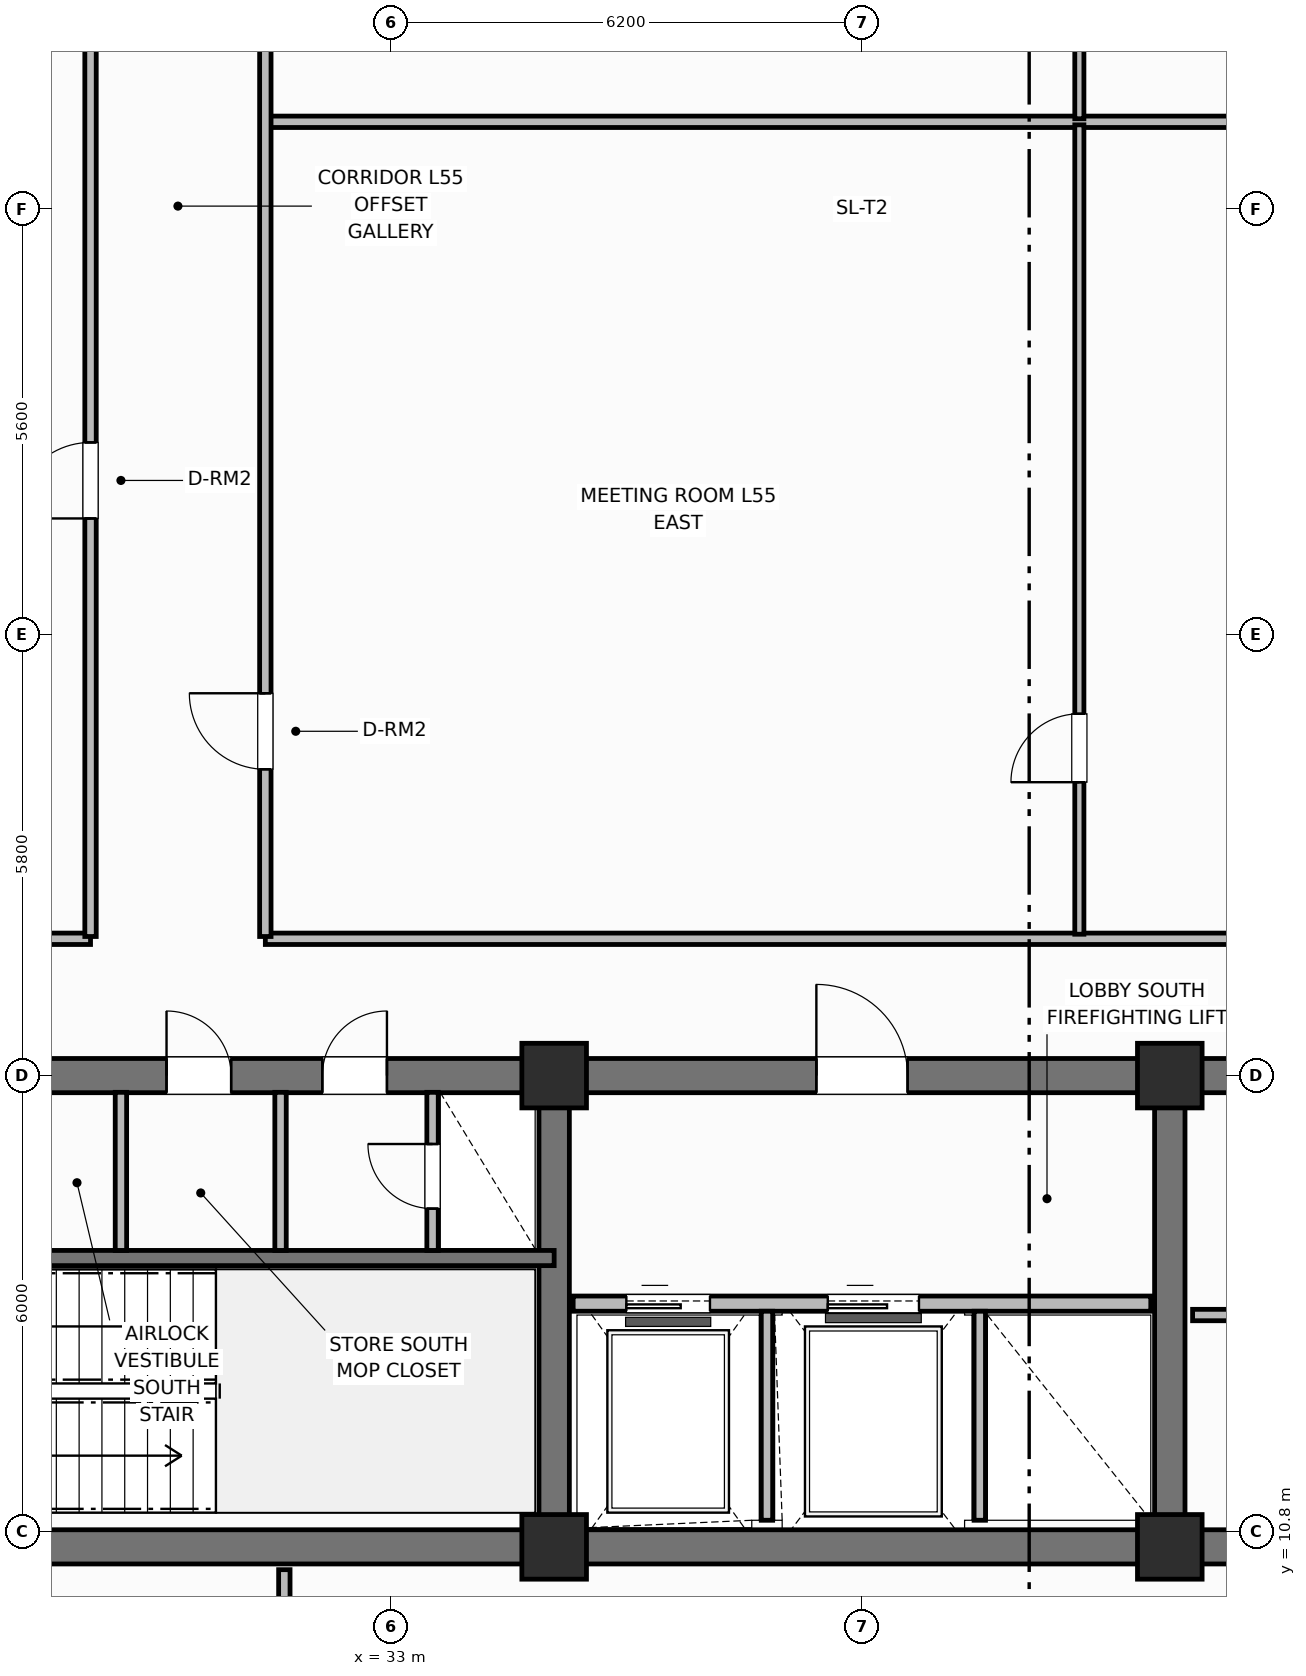
"""IFC4 building model, lengths in metres.
Left out: names, types, materials, properties, quantities, classifications, styles, units other than length and angle.
Written with IfcOpenShell. Run it as: python <this file> out.ifc"""

import sys

from ifc_helpers import new_model, si_unit, direction, frame, frame_2d, origin, origin_2d, place, context, subcontext, project, spatial, rectangle, extrude, element, fill, save


model = new_model("IFC4")
c1 = context("Model", 3, precision=1e-05, world=origin(), true_north=direction((0.0, 1.0)))
c2 = subcontext(c1, "Body", "Model", "MODEL_VIEW")
j1 = project(units=[si_unit("LENGTHUNIT", "METRE"), si_unit("PLANEANGLEUNIT", "RADIAN")], contexts=[c1])
p1 = place(None, origin())
s1 = spatial("IfcSite", under=j1, at=p1, CompositionType="ELEMENT")
p2 = place(p1, origin())
s2 = spatial("IfcBuilding", under=s1, at=p2, CompositionType="ELEMENT")
p3 = place(p2, frame((0.0, 0.0, 222.1)))
s3 = spatial("IfcBuildingStorey", under=s2, at=p3, CompositionType="ELEMENT", Elevation=222.1)
p4 = place(p3, frame((52.8, 10.6, 0.0), z_axis=(0.0, 0.0, 1.0), x_axis=(-1.0, 0.0, 0.0)))
e1 = element("IfcWall", 1, at=p4, inside=s3, PredefinedType="SHEAR", context=c2, shape_type="SweptSolid", body=[
    extrude(rectangle(XDim=27.2, YDim=0.45, at=frame_2d((13.6, 0.0))), origin(), (0.0, 0.0, 1.0), 3.7),
])
p5 = place(p3, frame((25.6, 16.8, 0.0), z_axis=(0.0, 0.0, 1.0), x_axis=(1.0, 0.0, 0.0)))
e2 = element("IfcWall", 2, at=p5, inside=s3, PredefinedType="SHEAR", context=c2, shape_type="SweptSolid", body=[
    extrude(rectangle(XDim=27.2, YDim=0.45, at=frame_2d((13.6, 0.0))), origin(), (0.0, 0.0, 1.0), 3.7),
])
p6 = place(p5, frame((1.7, 0.0, 0.0)))
e3 = element("IfcOpeningElement", 3, at=p6, cuts=e2, PredefinedType="OPENING", context=c2, shape_type="SweptSolid", body=[
    extrude(rectangle(XDim=1.1, YDim=2.15, at=frame_2d((0.55, 1.075))), frame((0.0, 0.235, 0.0), z_axis=(0.0, -1.0, 0.0), x_axis=(1.0, 0.0, 0.0)), (0.0, 0.0, 1.0), 0.47),
])
p7 = place(p5, frame((4.45, 0.0, 0.0)))
e4 = element("IfcOpeningElement", 4, at=p7, cuts=e2, PredefinedType="OPENING", context=c2, shape_type="SweptSolid", body=[
    extrude(rectangle(XDim=0.85, YDim=2.1, at=frame_2d((0.425, 1.05))), frame((0.0, 0.235, 0.0), z_axis=(0.0, -1.0, 0.0), x_axis=(1.0, 0.0, 0.0)), (0.0, 0.0, 1.0), 0.47),
])
p8 = place(p5, frame((6.5, 0.0, 0.0)))
e5 = element("IfcOpeningElement", 5, at=p8, cuts=e2, PredefinedType="OPENING", context=c2, shape_type="SweptSolid", body=[
    extrude(rectangle(XDim=0.85, YDim=2.1, at=frame_2d((0.425, 1.05))), frame((0.0, 0.235, 0.0), z_axis=(0.0, -1.0, 0.0), x_axis=(1.0, 0.0, 0.0)), (0.0, 0.0, 1.0), 0.47),
])
p9 = place(p5, frame((13.0, 0.0, 0.0)))
e6 = element("IfcOpeningElement", 6, at=p9, cuts=e2, PredefinedType="OPENING", context=c2, shape_type="SweptSolid", body=[
    extrude(rectangle(XDim=1.2, YDim=2.15, at=frame_2d((0.6, 1.075))), frame((0.0, 0.235, 0.0), z_axis=(0.0, -1.0, 0.0), x_axis=(1.0, 0.0, 0.0)), (0.0, 0.0, 1.0), 0.47),
])
p10 = place(p5, frame((19.8, 0.0, 0.0)))
e7 = element("IfcOpeningElement", 7, at=p10, cuts=e2, PredefinedType="OPENING", context=c2, shape_type="SweptSolid", body=[
    extrude(rectangle(XDim=0.85, YDim=2.1, at=frame_2d((0.425, 1.05))), frame((0.0, 0.235, 0.0), z_axis=(0.0, -1.0, 0.0), x_axis=(1.0, 0.0, 0.0)), (0.0, 0.0, 1.0), 0.47),
])
p11 = place(p5, frame((24.2, 0.0, 0.0)))
e8 = element("IfcOpeningElement", 8, at=p11, cuts=e2, PredefinedType="OPENING", context=c2, shape_type="SweptSolid", body=[
    extrude(rectangle(XDim=0.85, YDim=2.1, at=frame_2d((0.425, 1.05))), frame((0.0, 0.235, 0.0), z_axis=(0.0, -1.0, 0.0), x_axis=(1.0, 0.0, 0.0)), (0.0, 0.0, 1.0), 0.47),
])
for number, where, z_axis, x_axis in (
    (9, (35.15, 10.825, 0.0), (0.0, 0.0, 1.0), (0.0, 1.0, 0.0)),
    (10, (43.25, 10.825, 0.0), (0.0, 0.0, 1.0), (0.0, 1.0, 0.0)),
):
    element("IfcWall", number, at=place(p3, frame(where, z_axis=z_axis, x_axis=x_axis)), inside=s3, PredefinedType="SHEAR", context=c2, shape_type="SweptSolid", body=[
        extrude(rectangle(XDim=5.75, YDim=0.4, at=frame_2d((2.875, 0.0))), origin(), (0.0, 0.0, 1.0), 3.7),
    ])
for number, where, z_axis, x_axis in (
    (11, (35.15, 10.6, 0.0), (0.0, 0.0, 1.0), (1.0, 0.0, 0.0)),
    (12, (35.15, 16.8, 0.0), (0.0, 0.0, 1.0), (1.0, 0.0, 0.0)),
    (13, (43.25, 10.6, 0.0), (0.0, 0.0, 1.0), (1.0, 0.0, 0.0)),
    (14, (43.25, 16.8, 0.0), (0.0, 0.0, 1.0), (1.0, 0.0, 0.0)),
):
    element("IfcColumn", number, at=place(p3, frame(where, z_axis=z_axis, x_axis=x_axis)), inside=s3, PredefinedType="COLUMN", context=c2, shape_type="SweptSolid", body=[
        extrude(rectangle(XDim=0.85, YDim=0.85, at=origin_2d()), origin(), (0.0, 0.0, 1.0), 3.7),
    ])
p12 = place(p3, frame((25.6, 14.4, 0.0), z_axis=(0.0, 0.0, 1.0), x_axis=(1.0, 0.0, 0.0)))
e15 = element("IfcWall", 15, at=p12, inside=s3, PredefinedType="SHEAR", context=c2, shape_type="SweptSolid", body=[
    extrude(rectangle(XDim=9.55, YDim=0.2, at=frame_2d((4.775, 0.0))), origin(), (0.0, 0.0, 1.0), 3.7),
])
p13 = place(p12, frame((1.05, 0.0, 0.0)))
e16 = element("IfcOpeningElement", 16, at=p13, cuts=e15, PredefinedType="OPENING", context=c2, shape_type="SweptSolid", body=[
    extrude(rectangle(XDim=1.1, YDim=2.15, at=frame_2d((0.55, 1.075))), frame((0.0, 0.11, 0.0), z_axis=(0.0, -1.0, 0.0), x_axis=(1.0, 0.0, 0.0)), (0.0, 0.0, 1.0), 0.22),
])
for number, where, z_axis, x_axis in (
    (17, (29.45, 14.5, 0.0), (0.0, 0.0, 1.0), (0.0, 1.0, 0.0)),
    (18, (31.55, 14.5, 0.0), (0.0, 0.0, 1.0), (0.0, 1.0, 0.0)),
):
    element("IfcWall", number, at=place(p3, frame(where, z_axis=z_axis, x_axis=x_axis)), inside=s3, PredefinedType="PARTITIONING", context=c2, shape_type="SweptSolid", body=[
        extrude(rectangle(XDim=2.08, YDim=0.15, at=frame_2d((1.04, 0.0))), origin(), (0.0, 0.0, 1.0), 2.24),
    ])
p14 = place(p3, frame((33.55, 14.5, 0.0), z_axis=(0.0, 0.0, 1.0), x_axis=(0.0, 1.0, 0.0)))
e19 = element("IfcWall", 19, at=p14, inside=s3, PredefinedType="PARTITIONING", context=c2, shape_type="SweptSolid", body=[
    extrude(rectangle(XDim=2.08, YDim=0.15, at=frame_2d((1.04, 0.0))), origin(), (0.0, 0.0, 1.0), 2.24),
])
p15 = place(p14, frame((0.55, 0.0, 0.0)))
e20 = element("IfcOpeningElement", 20, at=p15, cuts=e19, PredefinedType="OPENING", context=c2, shape_type="SweptSolid", body=[
    extrude(rectangle(XDim=0.85, YDim=2.05, at=frame_2d((0.425, 1.025))), frame((0.0, 0.085, 0.0), z_axis=(0.0, -1.0, 0.0), x_axis=(1.0, 0.0, 0.0)), (0.0, 0.0, 1.0), 0.17),
])
p16 = place(p3, frame((35.4, 13.8, 0.0), z_axis=(0.0, 0.0, 1.0), x_axis=(1.0, 0.0, 0.0)))
e21 = element("IfcWall", 21, at=p16, inside=s3, PredefinedType="PARTITIONING", context=c2, shape_type="SweptSolid", body=[
    extrude(rectangle(XDim=7.6, YDim=0.2, at=frame_2d((3.8, 0.0))), origin(), (0.0, 0.0, 1.0), 2.18),
])
p17 = place(p16, frame((0.7, 0.0, 0.0)))
e22 = element("IfcOpeningElement", 22, at=p17, cuts=e21, PredefinedType="OPENING", context=c2, shape_type="SweptSolid", body=[
    extrude(rectangle(XDim=1.1, YDim=2.15, at=frame_2d((0.55, 1.075))), frame((0.0, 0.11, 0.0), z_axis=(0.0, -1.0, 0.0), x_axis=(1.0, 0.0, 0.0)), (0.0, 0.0, 1.0), 0.22),
])
p18 = place(p16, frame((3.35, 0.0, 0.0)))
e23 = element("IfcOpeningElement", 23, at=p18, cuts=e21, PredefinedType="OPENING", context=c2, shape_type="SweptSolid", body=[
    extrude(rectangle(XDim=1.2, YDim=2.15, at=frame_2d((0.6, 1.075))), frame((0.0, 0.11, 0.0), z_axis=(0.0, -1.0, 0.0), x_axis=(1.0, 0.0, 0.0)), (0.0, 0.0, 1.0), 0.22),
])
for number, where, z_axis, x_axis in (
    (24, (37.95, 10.95, 0.0), (0.0, 0.0, 1.0), (0.0, 1.0, 0.0)),
    (25, (40.75, 10.95, 0.0), (0.0, 0.0, 1.0), (0.0, 1.0, 0.0)),
):
    element("IfcWall", number, at=place(p3, frame(where, z_axis=z_axis, x_axis=x_axis)), inside=s3, PredefinedType="PARTITIONING", context=c2, shape_type="SweptSolid", body=[
        extrude(rectangle(XDim=2.75, YDim=0.15, at=frame_2d((1.375, 0.0))), origin(), (0.0, 0.0, 1.0), 2.24),
    ])
p19 = place(p3, frame((43.55, 13.65, 0.0), z_axis=(0.0, 0.0, 1.0), x_axis=(1.0, 0.0, 0.0)))
e26 = element("IfcWall", 26, at=p19, inside=s3, PredefinedType="PARTITIONING", context=c2, shape_type="SweptSolid", body=[
    extrude(rectangle(XDim=4.4, YDim=0.15, at=frame_2d((2.2, 0.0))), origin(), (0.0, 0.0, 1.0), 2.24),
])
p20 = place(p19, frame((1.6, 0.0, 0.0)))
e27 = element("IfcOpeningElement", 27, at=p20, cuts=e26, PredefinedType="OPENING", context=c2, shape_type="SweptSolid", body=[
    extrude(rectangle(XDim=0.85, YDim=2.1, at=frame_2d((0.425, 1.05))), frame((0.0, 0.085, 0.0), z_axis=(0.0, -1.0, 0.0), x_axis=(1.0, 0.0, 0.0)), (0.0, 0.0, 1.0), 0.17),
])
p21 = place(p3, frame((25.55, 18.6, 0.0), z_axis=(0.0, 0.0, 1.0), x_axis=(1.0, 0.0, 0.0)))
e28 = element("IfcWall", 28, at=p21, inside=s3, PredefinedType="PARTITIONING", context=c2, shape_type="SweptSolid", body=[
    extrude(rectangle(XDim=3.5, YDim=0.15, at=frame_2d((1.75, 0.0))), origin(), (0.0, 0.0, 1.0), 2.24),
])
p22 = place(p3, frame((31.35, 18.6, 0.0), z_axis=(0.0, 0.0, 1.0), x_axis=(1.0, 0.0, 0.0)))
e29 = element("IfcWall", 29, at=p22, inside=s3, PredefinedType="PARTITIONING", context=c2, shape_type="SweptSolid", body=[
    extrude(rectangle(XDim=21.5, YDim=0.15, at=frame_2d((10.75, 0.0))), origin(), (0.0, 0.0, 1.0), 2.24),
])
p23 = place(p3, frame((31.38, 29.348, 0.0), z_axis=(0.0, 0.0, 1.0), x_axis=(1.0, 0.0, 0.0)))
e30 = element("IfcWall", 30, at=p23, inside=s3, PredefinedType="PARTITIONING", context=c2, shape_type="SweptSolid", body=[
    extrude(rectangle(XDim=21.42, YDim=0.15, at=frame_2d((10.71, 0.0))), origin(), (0.0, 0.0, 1.0), 2.24),
])
p24 = place(p3, frame((42.06, 18.66, 0.0), z_axis=(0.0, 0.0, 1.0), x_axis=(0.0, 1.0, 0.0)))
e31 = element("IfcWall", 31, at=p24, inside=s3, PredefinedType="PARTITIONING", context=c2, shape_type="SweptSolid", body=[
    extrude(rectangle(XDim=10.648, YDim=0.12, at=frame_2d((5.324, 0.0))), origin(), (0.0, 0.0, 1.0), 2.24),
])
p25 = place(p24, frame((2.0, 0.0, 0.0)))
e32 = element("IfcOpeningElement", 32, at=p25, cuts=e31, PredefinedType="OPENING", context=c2, shape_type="SweptSolid", body=[
    extrude(rectangle(XDim=0.9, YDim=2.1, at=frame_2d((0.45, 1.05))), frame((0.0, 0.07, 0.0), z_axis=(0.0, -1.0, 0.0), x_axis=(1.0, 0.0, 0.0)), (0.0, 0.0, 1.0), 0.14),
])
p26 = place(p3, frame((42.06, 29.388, 0.0), z_axis=(0.0, 0.0, 1.0), x_axis=(0.0, 1.0, 0.0)))
e33 = element("IfcWall", 33, at=p26, inside=s3, PredefinedType="PARTITIONING", context=c2, shape_type="SweptSolid", body=[
    extrude(rectangle(XDim=8.352, YDim=0.12, at=frame_2d((4.176, 0.0))), origin(), (0.0, 0.0, 1.0), 2.24),
])
p27 = place(p26, frame((2.0, 0.0, 0.0)))
e34 = element("IfcOpeningElement", 34, at=p27, cuts=e33, PredefinedType="OPENING", context=c2, shape_type="SweptSolid", body=[
    extrude(rectangle(XDim=0.9, YDim=2.1, at=frame_2d((0.45, 1.05))), frame((0.0, 0.07, 0.0), z_axis=(0.0, -1.0, 0.0), x_axis=(1.0, 0.0, 0.0)), (0.0, 0.0, 1.0), 0.14),
])
p28 = place(p3, frame((29.05, 18.63, 0.0), z_axis=(0.0, 0.0, 1.0), x_axis=(0.0, 1.0, 0.0)))
e35 = element("IfcWall", 35, at=p28, inside=s3, PredefinedType="PARTITIONING", context=c2, shape_type="SweptSolid", body=[
    extrude(rectangle(XDim=19.14, YDim=0.15, at=frame_2d((9.57, 0.0))), origin(), (0.0, 0.0, 1.0), 2.24),
])
p29 = place(p28, frame((5.5, 0.0, 0.0)))
e36 = element("IfcOpeningElement", 36, at=p29, cuts=e35, PredefinedType="OPENING", context=c2, shape_type="SweptSolid", body=[
    extrude(rectangle(XDim=1.0, YDim=2.15, at=frame_2d((0.5, 1.075))), frame((0.0, 0.085, 0.0), z_axis=(0.0, -1.0, 0.0), x_axis=(1.0, 0.0, 0.0)), (0.0, 0.0, 1.0), 0.17),
])
p30 = place(p3, frame((31.35, 18.63, 0.0), z_axis=(0.0, 0.0, 1.0), x_axis=(0.0, 1.0, 0.0)))
e37 = element("IfcWall", 37, at=p30, inside=s3, PredefinedType="PARTITIONING", context=c2, shape_type="SweptSolid", body=[
    extrude(rectangle(XDim=19.14, YDim=0.15, at=frame_2d((9.57, 0.0))), origin(), (0.0, 0.0, 1.0), 2.24),
])
p31 = place(p30, frame((2.2, 0.0, 0.0)))
e38 = element("IfcOpeningElement", 38, at=p31, cuts=e37, PredefinedType="OPENING", context=c2, shape_type="SweptSolid", body=[
    extrude(rectangle(XDim=1.0, YDim=2.15, at=frame_2d((0.5, 1.075))), frame((0.0, 0.085, 0.0), z_axis=(0.0, -1.0, 0.0), x_axis=(1.0, 0.0, 0.0)), (0.0, 0.0, 1.0), 0.17),
])
p32 = place(p30, frame((12.719, 0.0, 0.0)))
e39 = element("IfcOpeningElement", 39, at=p32, cuts=e37, PredefinedType="OPENING", context=c2, shape_type="SweptSolid", body=[
    extrude(rectangle(XDim=1.0, YDim=2.15, at=frame_2d((0.5, 1.075))), frame((0.0, 0.085, 0.0), z_axis=(0.0, -1.0, 0.0), x_axis=(1.0, 0.0, 0.0)), (0.0, 0.0, 1.0), 0.17),
])
p33 = place(p3, frame((31.6, 6.87, 0.0), z_axis=(0.0, 0.0, 1.0), x_axis=(0.0, 1.0, 0.0)))
e40 = element("IfcWall", 40, at=p33, inside=s3, PredefinedType="PARTITIONING", context=c2, shape_type="SweptSolid", body=[
    extrude(rectangle(XDim=3.43, YDim=0.15, at=frame_2d((1.715, 0.0))), origin(), (0.0, 0.0, 1.0), 2.24),
])
p34 = place(p33, frame((1.7, 0.0, 0.0)))
e41 = element("IfcOpeningElement", 41, at=p34, cuts=e40, PredefinedType="OPENING", context=c2, shape_type="SweptSolid", body=[
    extrude(rectangle(XDim=0.9, YDim=2.1, at=frame_2d((0.45, 1.05))), frame((0.0, 0.085, 0.0), z_axis=(0.0, -1.0, 0.0), x_axis=(1.0, 0.0, 0.0)), (0.0, 0.0, 1.0), 0.17),
])
p35 = place(p15, origin())
e42 = element("IfcDoor", 42, at=p35, inside=s3, OperationType="SINGLE_SWING_RIGHT", PredefinedType="TRAPDOOR", context=c2, shape_type="SweptSolid", body=[
    extrude(rectangle(XDim=0.85, YDim=2.05, at=frame_2d((0.425, 1.025))), frame((0.0, 0.025, 0.0), z_axis=(0.0, -1.0, 0.0), x_axis=(1.0, 0.0, 0.0)), (0.0, 0.0, 1.0), 0.05),
])
fill(e20, e42)
p36 = place(p17, origin())
e43 = element("IfcDoor", 43, at=p36, inside=s3, OperationType="SLIDING_TO_LEFT", PredefinedType="DOOR", context=c2, shape_type="SweptSolid", body=[
    extrude(rectangle(XDim=1.1, YDim=2.15, at=frame_2d((0.55, 1.075))), frame((0.0, 0.025, 0.0), z_axis=(0.0, -1.0, 0.0), x_axis=(1.0, 0.0, 0.0)), (0.0, 0.0, 1.0), 0.05),
])
fill(e22, e43)
p37 = place(p18, origin())
e44 = element("IfcDoor", 44, at=p37, inside=s3, OperationType="SLIDING_TO_LEFT", PredefinedType="DOOR", context=c2, shape_type="SweptSolid", body=[
    extrude(rectangle(XDim=1.2, YDim=2.15, at=frame_2d((0.6, 1.075))), frame((0.0, 0.025, 0.0), z_axis=(0.0, -1.0, 0.0), x_axis=(1.0, 0.0, 0.0)), (0.0, 0.0, 1.0), 0.05),
])
fill(e23, e44)
p38 = place(p25, origin())
e45 = element("IfcDoor", 45, at=p38, inside=s3, OperationType="SINGLE_SWING_LEFT", PredefinedType="DOOR", context=c2, shape_type="SweptSolid", body=[
    extrude(rectangle(XDim=0.9, YDim=2.1, at=frame_2d((0.45, 1.05))), frame((0.0, 0.025, 0.0), z_axis=(0.0, -1.0, 0.0), x_axis=(1.0, 0.0, 0.0)), (0.0, 0.0, 1.0), 0.05),
])
fill(e32, e45)
p39 = place(p29, origin())
e46 = element("IfcDoor", 46, at=p39, inside=s3, OperationType="SINGLE_SWING_LEFT", PredefinedType="DOOR", context=c2, shape_type="SweptSolid", body=[
    extrude(rectangle(XDim=1.0, YDim=2.15, at=frame_2d((0.5, 1.075))), frame((0.0, 0.025, 0.0), z_axis=(0.0, -1.0, 0.0), x_axis=(1.0, 0.0, 0.0)), (0.0, 0.0, 1.0), 0.05),
])
fill(e36, e46)
p40 = place(p31, origin())
e47 = element("IfcDoor", 47, at=p40, inside=s3, OperationType="SINGLE_SWING_RIGHT", PredefinedType="DOOR", context=c2, shape_type="SweptSolid", body=[
    extrude(rectangle(XDim=1.0, YDim=2.15, at=frame_2d((0.5, 1.075))), frame((0.0, 0.025, 0.0), z_axis=(0.0, -1.0, 0.0), x_axis=(1.0, 0.0, 0.0)), (0.0, 0.0, 1.0), 0.05),
])
fill(e38, e47)
p41 = place(p7, origin())
e48 = element("IfcDoor", 48, at=p41, inside=s3, OperationType="SINGLE_SWING_LEFT", PredefinedType="DOOR", context=c2, shape_type="SweptSolid", body=[
    extrude(rectangle(XDim=0.85, YDim=2.1, at=frame_2d((0.425, 1.05))), frame((0.0, 0.025, 0.0), z_axis=(0.0, -1.0, 0.0), x_axis=(1.0, 0.0, 0.0)), (0.0, 0.0, 1.0), 0.05),
])
fill(e4, e48)
p42 = place(p8, origin())
e49 = element("IfcDoor", 49, at=p42, inside=s3, OperationType="SINGLE_SWING_RIGHT", PredefinedType="DOOR", context=c2, shape_type="SweptSolid", body=[
    extrude(rectangle(XDim=0.85, YDim=2.1, at=frame_2d((0.425, 1.05))), frame((0.0, 0.025, 0.0), z_axis=(0.0, -1.0, 0.0), x_axis=(1.0, 0.0, 0.0)), (0.0, 0.0, 1.0), 0.05),
])
fill(e5, e49)
p43 = place(p9, origin())
e50 = element("IfcDoor", 50, at=p43, inside=s3, OperationType="SINGLE_SWING_LEFT", PredefinedType="DOOR", context=c2, shape_type="SweptSolid", body=[
    extrude(rectangle(XDim=1.2, YDim=2.15, at=frame_2d((0.6, 1.075))), frame((0.0, 0.025, 0.0), z_axis=(0.0, -1.0, 0.0), x_axis=(1.0, 0.0, 0.0)), (0.0, 0.0, 1.0), 0.05),
])
fill(e6, e50)
save(model, sys.argv[1])
